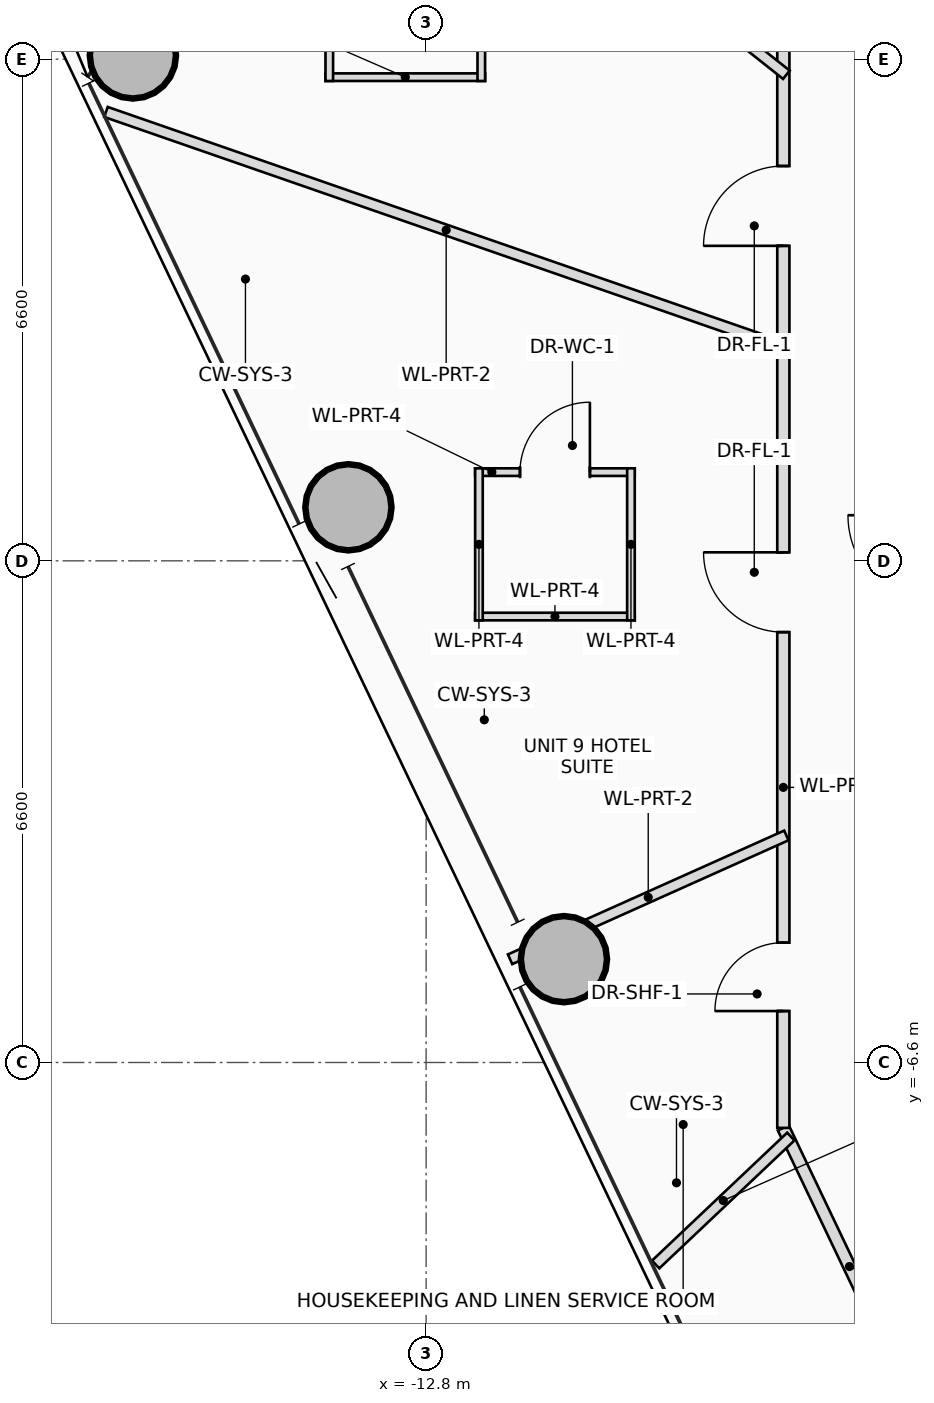
"""IFC4 building model, lengths in metres.
Left out: names, types, materials, properties, quantities, classifications, styles, units other than length and angle.
Written with IfcOpenShell. Run it as: python <this file> out.ifc"""

import sys

from ifc_helpers import new_model, si_unit, direction, frame, frame_2d, origin, origin_2d, place, context, subcontext, project, spatial, rectangle, hollow_circle, extrude, source, transform, mapped, element, fill, save


model = new_model("IFC4")
c1 = context("Model", 3, precision=1e-05, world=origin(), true_north=direction((0.0, 1.0)))
c2 = subcontext(c1, "Body", "Model", "MODEL_VIEW")
j1 = project(units=[si_unit("LENGTHUNIT", "METRE"), si_unit("PLANEANGLEUNIT", "RADIAN")], contexts=[c1])
p1 = place(None, origin())
s1 = spatial("IfcSite", under=j1, at=p1, CompositionType="ELEMENT")
p2 = place(p1, origin())
s2 = spatial("IfcBuilding", under=s1, at=p2, CompositionType="ELEMENT")
p3 = place(p2, frame((0.0, 0.0, 201.8)))
s3 = spatial("IfcBuildingStorey", under=s2, at=p3, CompositionType="ELEMENT", Elevation=201.8)
m1 = source(origin(), c2, "Body", "SweptSolid", [
    extrude(hollow_circle(Radius=0.575, WallThickness=0.042, at=origin_2d()), origin(), (0.0, 0.0, 1.0), 3.45),
])
for number, where, z_axis, x_axis in (
    (1, (-16.658, 6.649, 0.0), (0.0, 0.0, 1.0), (1.0, 0.0, 0.0)),
    (2, (-13.823, 0.704, 0.0), (0.0, 0.0, 1.0), (1.0, 0.0, 0.0)),
    (3, (-10.987, -5.24, 0.0), (0.0, 0.0, 1.0), (1.0, 0.0, 0.0)),
):
    element("IfcColumn", number, at=place(p3, frame(where, z_axis=z_axis, x_axis=x_axis)), inside=s3, PredefinedType="COLUMN", context=c2, shape_type="MappedRepresentation", body=[
        mapped(m1, transform((0.0, 0.0, 0.0), scale=1.0)),
    ])
p4 = place(p3, frame((-12.024, 6.363, 0.0), z_axis=(0.0, 0.0, 1.0), x_axis=(-1.0, 0.0, 0.0)))
e4 = element("IfcWall", 4, at=p4, inside=s3, PredefinedType="PARTITIONING", context=c2, shape_type="SweptSolid", body=[
    extrude(rectangle(XDim=2.1, YDim=0.1, at=frame_2d((1.05, 0.0))), origin(), (0.0, 0.0, 1.0), 2.605),
])
p5 = place(p3, frame((-12.074, 8.313, 0.0), z_axis=(0.0, 0.0, 1.0), x_axis=(0.0, -1.0, 0.0)))
e5 = element("IfcWall", 5, at=p5, inside=s3, PredefinedType="PARTITIONING", context=c2, shape_type="SweptSolid", body=[
    extrude(rectangle(XDim=2.0, YDim=0.1, at=frame_2d((1.0, 0.0))), origin(), (0.0, 0.0, 1.0), 2.905),
])
p6 = place(p3, frame((-14.074, 6.313, 0.0), z_axis=(0.0, 0.0, 1.0), x_axis=(0.0, 1.0, 0.0)))
e6 = element("IfcWall", 6, at=p6, inside=s3, PredefinedType="PARTITIONING", context=c2, shape_type="SweptSolid", body=[
    extrude(rectangle(XDim=2.0, YDim=0.1, at=frame_2d((1.0, 0.0))), origin(), (0.0, 0.0, 1.0), 2.605),
])
p7 = place(p3, frame((-12.155, 1.167, 0.0), z_axis=(0.0, 0.0, 1.0), x_axis=(1.0, 0.0, 0.0)))
e7 = element("IfcWall", 7, at=p7, inside=s3, PredefinedType="PARTITIONING", context=c2, shape_type="SweptSolid", body=[
    extrude(rectangle(XDim=2.1, YDim=0.1, at=frame_2d((1.05, 0.0))), origin(), (0.0, 0.0, 1.0), 2.905),
])
p8 = place(p7, frame((0.59, 0.0, 0.0)))
e8 = element("IfcOpeningElement", 8, at=p8, cuts=e7, PredefinedType="OPENING", context=c2, shape_type="SweptSolid", body=[
    extrude(rectangle(XDim=0.92, YDim=2.1, at=frame_2d((0.46, 1.05))), frame((0.0, 0.06, 0.0), z_axis=(0.0, -1.0, 0.0), x_axis=(1.0, 0.0, 0.0)), (0.0, 0.0, 1.0), 0.12),
])
p9 = place(p3, frame((-10.055, -0.733, 0.0), z_axis=(0.0, 0.0, 1.0), x_axis=(-1.0, 0.0, 0.0)))
e9 = element("IfcWall", 9, at=p9, inside=s3, PredefinedType="PARTITIONING", context=c2, shape_type="SweptSolid", body=[
    extrude(rectangle(XDim=2.1, YDim=0.1, at=frame_2d((1.05, 0.0))), origin(), (0.0, 0.0, 1.0), 2.905),
])
for number, where, z_axis, x_axis in (
    (10, (-10.105, 1.217, 0.0), (0.0, 0.0, 1.0), (0.0, -1.0, 0.0)),
    (11, (-12.105, -0.783, 0.0), (0.0, 0.0, 1.0), (0.0, 1.0, 0.0)),
):
    element("IfcWall", number, at=place(p3, frame(where, z_axis=z_axis, x_axis=x_axis)), inside=s3, PredefinedType="PARTITIONING", context=c2, shape_type="SweptSolid", body=[
        extrude(rectangle(XDim=2.0, YDim=0.1, at=frame_2d((1.0, 0.0))), origin(), (0.0, 0.0, 1.0), 3.25),
    ])
p10 = place(p3, frame((-6.36, -11.108, 0.0), z_axis=(0.0, 0.0, 1.0), x_axis=(-0.430489180359, 0.902595737633, 0.0)))
e12 = element("IfcWall", 12, at=p10, inside=s3, PredefinedType="PARTITIONING", context=c2, shape_type="SweptSolid", body=[
    extrude(rectangle(XDim=4.042, YDim=0.16, at=frame_2d((2.021, 0.0))), origin(), (0.0, 0.0, 1.0), 2.605),
])
p11 = place(p3, frame((-8.1, -7.46, 0.0), z_axis=(0.0, 0.0, 1.0), x_axis=(0.0, 1.0, 0.0)))
e13 = element("IfcWall", 13, at=p11, inside=s3, PredefinedType="PARTITIONING", context=c2, shape_type="SweptSolid", body=[
    extrude(rectangle(XDim=15.01, YDim=0.16, at=frame_2d((7.505, 0.0))), origin(), (0.0, 0.0, 1.0), 2.605),
])
p12 = place(p11, frame((1.537, 0.0, 0.0)))
e14 = element("IfcOpeningElement", 14, at=p12, cuts=e13, PredefinedType="OPENING", context=c2, shape_type="SweptSolid", body=[
    extrude(rectangle(XDim=0.9, YDim=2.05, at=frame_2d((0.45, 1.025))), frame((0.0, 0.09, 0.0), z_axis=(0.0, -1.0, 0.0), x_axis=(1.0, 0.0, 0.0)), (0.0, 0.0, 1.0), 0.18),
])
p13 = place(p11, frame((6.522, 0.0, 0.0)))
e15 = element("IfcOpeningElement", 15, at=p13, cuts=e13, PredefinedType="OPENING", context=c2, shape_type="SweptSolid", body=[
    extrude(rectangle(XDim=1.05, YDim=2.2, at=frame_2d((0.525, 1.1))), frame((0.0, 0.09, 0.0), z_axis=(0.0, -1.0, 0.0), x_axis=(1.0, 0.0, 0.0)), (0.0, 0.0, 1.0), 0.18),
])
p14 = place(p11, frame((11.604, 0.0, 0.0)))
e16 = element("IfcOpeningElement", 16, at=p14, cuts=e13, PredefinedType="OPENING", context=c2, shape_type="SweptSolid", body=[
    extrude(rectangle(XDim=1.05, YDim=2.2, at=frame_2d((0.525, 1.1))), frame((0.0, 0.09, 0.0), z_axis=(0.0, -1.0, 0.0), x_axis=(1.0, 0.0, 0.0)), (0.0, 0.0, 1.0), 0.18),
])
p15 = place(p3, frame((-8.06, 6.395, 0.0), z_axis=(0.0, 0.0, 1.0), x_axis=(-0.783385602556, 0.621535998723, 0.0)))
e17 = element("IfcWall", 17, at=p15, inside=s3, PredefinedType="PARTITIONING", context=c2, shape_type="SweptSolid", body=[
    extrude(rectangle(XDim=8.449, YDim=0.14, at=frame_2d((4.224, 0.0))), origin(), (0.0, 0.0, 1.0), 2.605),
])
p16 = place(p3, frame((-8.06, 2.798, 0.0), z_axis=(0.0, 0.0, 1.0), x_axis=(-0.944705149401, 0.327920997643, 0.0)))
e18 = element("IfcWall", 18, at=p16, inside=s3, PredefinedType="PARTITIONING", context=c2, shape_type="SweptSolid", body=[
    extrude(rectangle(XDim=9.476, YDim=0.14, at=frame_2d((4.738, 0.0))), origin(), (0.0, 0.0, 1.0), 2.605),
])
p17 = place(p3, frame((-8.06, -3.613, 0.0), z_axis=(0.0, 0.0, 1.0), x_axis=(-0.91252825503, -0.409013671865, 0.0)))
e19 = element("IfcWall", 19, at=p17, inside=s3, PredefinedType="PARTITIONING", context=c2, shape_type="SweptSolid", body=[
    extrude(rectangle(XDim=3.984, YDim=0.14, at=frame_2d((1.992, 0.0))), origin(), (0.0, 0.0, 1.0), 2.805),
])
p18 = place(p3, frame((-8.001, -7.574, 0.0), z_axis=(0.0, 0.0, 1.0), x_axis=(-0.726232954986, -0.687448685424, 0.0)))
e20 = element("IfcWall", 20, at=p18, inside=s3, PredefinedType="PARTITIONING", context=c2, shape_type="SweptSolid", body=[
    extrude(rectangle(XDim=2.449, YDim=0.14, at=frame_2d((1.224, 0.0))), origin(), (0.0, 0.0, 1.0), 2.765),
])
p19 = place(p8, origin())
e21 = element("IfcDoor", 21, at=p19, inside=s3, OperationType="SINGLE_SWING_RIGHT", PredefinedType="DOOR", context=c2, shape_type="SweptSolid", body=[
    extrude(rectangle(XDim=0.92, YDim=2.1, at=frame_2d((0.46, 1.05))), frame((0.0, 0.025, 0.0), z_axis=(0.0, -1.0, 0.0), x_axis=(1.0, 0.0, 0.0)), (0.0, 0.0, 1.0), 0.05),
])
fill(e8, e21)
p20 = place(p12, origin())
e22 = element("IfcDoor", 22, at=p20, inside=s3, OperationType="SINGLE_SWING_LEFT", PredefinedType="DOOR", context=c2, shape_type="SweptSolid", body=[
    extrude(rectangle(XDim=0.9, YDim=2.05, at=frame_2d((0.45, 1.025))), frame((0.0, 0.025, 0.0), z_axis=(0.0, -1.0, 0.0), x_axis=(1.0, 0.0, 0.0)), (0.0, 0.0, 1.0), 0.05),
])
fill(e14, e22)
p21 = place(p13, origin())
e23 = element("IfcDoor", 23, at=p21, inside=s3, OperationType="SINGLE_SWING_RIGHT", PredefinedType="DOOR", context=c2, shape_type="SweptSolid", body=[
    extrude(rectangle(XDim=1.05, YDim=2.2, at=frame_2d((0.525, 1.1))), frame((0.0, 0.025, 0.0), z_axis=(0.0, -1.0, 0.0), x_axis=(1.0, 0.0, 0.0)), (0.0, 0.0, 1.0), 0.05),
])
fill(e15, e23)
p22 = place(p14, origin())
e24 = element("IfcDoor", 24, at=p22, inside=s3, OperationType="SINGLE_SWING_LEFT", PredefinedType="DOOR", context=c2, shape_type="SweptSolid", body=[
    extrude(rectangle(XDim=1.05, YDim=2.2, at=frame_2d((0.525, 1.1))), frame((0.0, 0.025, 0.0), z_axis=(0.0, -1.0, 0.0), x_axis=(1.0, 0.0, 0.0)), (0.0, 0.0, 1.0), 0.05),
])
fill(e16, e24)
save(model, sys.argv[1])
